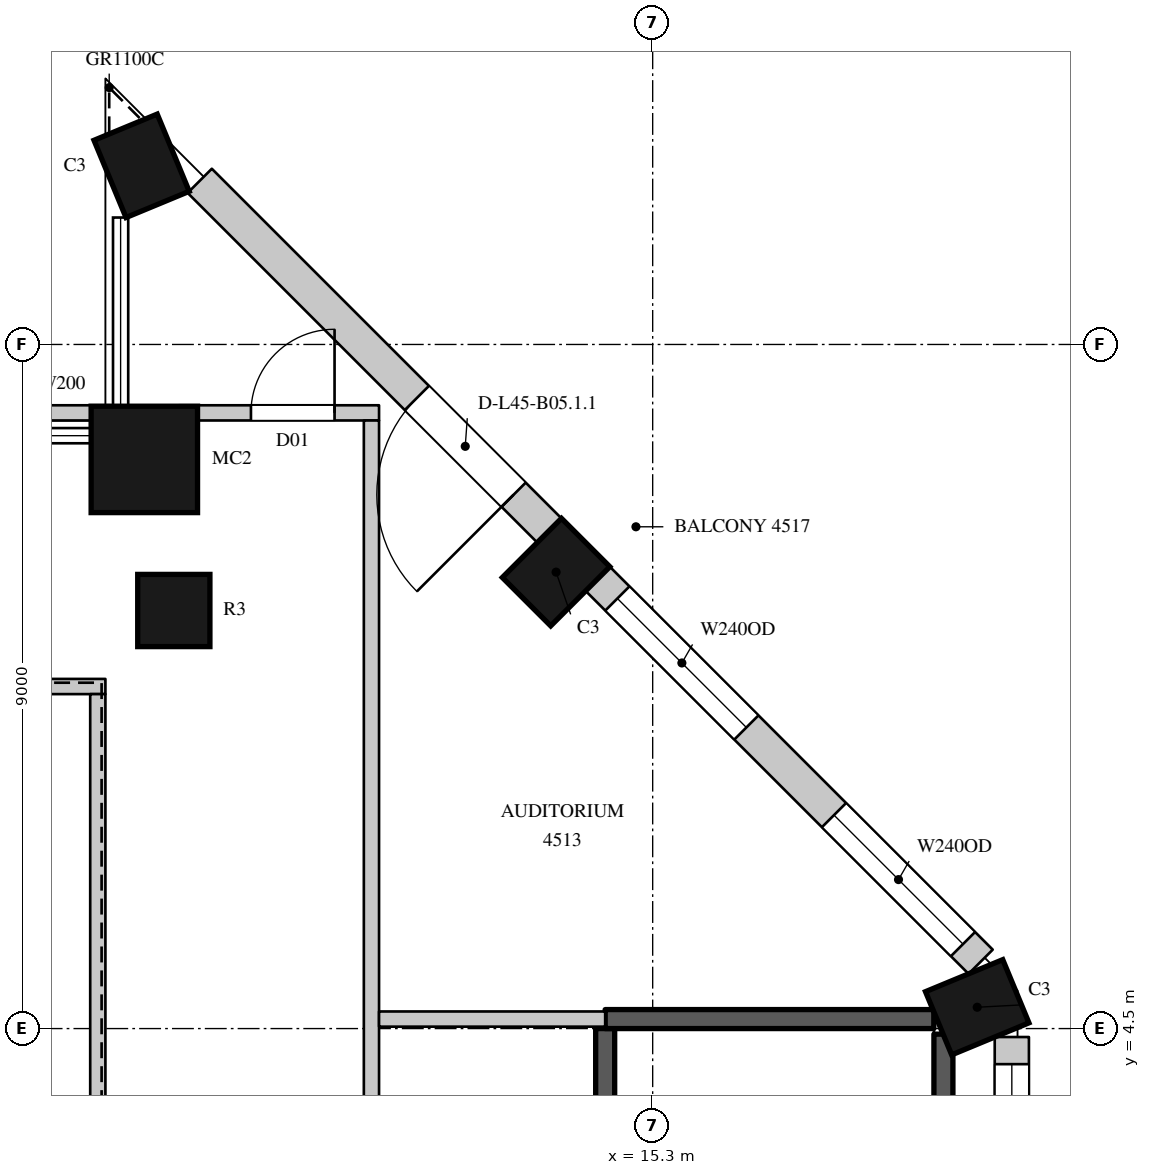
"""IFC4 building model, lengths in metres.
Left out: names, types, materials, properties, quantities, classifications, styles, units other than length and angle.
Written with IfcOpenShell. Run it as: python <this file> out.ifc"""

import sys

from ifc_helpers import new_model, si_unit, direction, frame, frame_2d, origin, origin_2d, place, context, subcontext, project, spatial, rectangle, circle, extrude, element, fill, save


model = new_model("IFC4")
c1 = context("Model", 3, precision=1e-05, world=origin(), true_north=direction((0.0, 1.0)))
c2 = subcontext(c1, "Body", "Model", "MODEL_VIEW")
j1 = project(units=[si_unit("LENGTHUNIT", "METRE"), si_unit("PLANEANGLEUNIT", "RADIAN")], contexts=[c1])
p1 = place(None, origin())
s1 = spatial("IfcSite", under=j1, at=p1, CompositionType="ELEMENT")
p2 = place(p1, origin())
s2 = spatial("IfcBuilding", under=s1, at=p2, CompositionType="ELEMENT")
p3 = place(p2, frame((0.0, 0.0, 205.6)))
s3 = spatial("IfcBuildingStorey", under=s2, at=p3, CompositionType="ELEMENT", Elevation=205.6)
for number, where, z_axis, x_axis in (
    (1, (19.57, 4.78, 0.0), (0.0, 0.0, 1.0), (-0.383, 0.924, 0.0)),
    (2, (14.029, 10.505, 0.0), (0.0, 0.0, 1.0), (-0.707, 0.707, 0.0)),
    (3, (8.576, 15.85, 0.0), (0.0, 0.0, 1.0), (-0.924, -0.383, 0.0)),
):
    element("IfcColumn", number, at=place(p3, frame(where, z_axis=z_axis, x_axis=x_axis)), inside=s3, PredefinedType="COLUMN", context=c2, shape_type="SweptSolid", body=[
        extrude(rectangle(XDim=0.9, YDim=1.1, at=origin_2d()), origin(), (0.0, 0.0, 1.0), 4.1),
    ])
p4 = place(p3, frame((8.612, 11.988, 0.0), z_axis=(0.0, 0.0, 1.0), x_axis=(1.0, 0.0, 0.0)))
e4 = element("IfcColumn", 4, at=p4, inside=s3, PredefinedType="COLUMN", context=c2, shape_type="SweptSolid", body=[
    extrude(circle(Radius=0.7, at=origin_2d()), origin(), (0.0, 0.0, 1.0), 4.1),
])
p5 = place(p3, frame((9.0, 10.0, 0.0), z_axis=(0.0, 0.0, 1.0), x_axis=(1.0, 0.0, 0.0)))
e5 = element("IfcColumn", 5, at=p5, inside=s3, PredefinedType="COLUMN", context=c2, shape_type="SweptSolid", body=[
    extrude(circle(Radius=0.475, at=origin_2d()), origin(), (0.0, 0.0, 1.0), 4.1),
])
p6 = place(p3, frame((20.025, -4.05, 0.0), z_axis=(0.0, 0.0, 1.0), x_axis=(0.0, 1.0, 0.0)))
e6 = element("IfcWall", 6, at=p6, inside=s3, PredefinedType="SOLIDWALL", context=c2, shape_type="SweptSolid", body=[
    extrude(rectangle(XDim=8.439, YDim=0.45, at=frame_2d((4.219, 0.0))), origin(), (0.0, 0.0, 1.0), 3.8),
])
p7 = place(p6, frame((0.394, 0.0, 1.05)))
e7 = element("IfcOpeningElement", 7, at=p7, cuts=e6, PredefinedType="OPENING", context=c2, shape_type="SweptSolid", body=[
    extrude(rectangle(XDim=3.0, YDim=2.4, at=frame_2d((1.5, 1.2))), frame((0.0, 0.235, 0.0), z_axis=(0.0, -1.0, 0.0), x_axis=(1.0, 0.0, 0.0)), (0.0, 0.0, 1.0), 0.47),
])
p8 = place(p6, frame((5.082, 0.0, 1.05)))
e8 = element("IfcOpeningElement", 8, at=p8, cuts=e6, PredefinedType="OPENING", context=c2, shape_type="SweptSolid", body=[
    extrude(rectangle(XDim=3.0, YDim=2.4, at=frame_2d((1.5, 1.2))), frame((0.0, 0.235, 0.0), z_axis=(0.0, -1.0, 0.0), x_axis=(1.0, 0.0, 0.0)), (0.0, 0.0, 1.0), 0.47),
])
p9 = place(p3, frame((19.615, 5.379, 0.0), z_axis=(0.0, 0.0, 1.0), x_axis=(-0.707089646058, 0.7071239159, 0.0)))
e9 = element("IfcWall", 9, at=p9, inside=s3, PredefinedType="SOLIDWALL", context=c2, shape_type="SweptSolid", body=[
    extrude(rectangle(XDim=7.124, YDim=0.45, at=frame_2d((3.562, 0.0))), origin(), (0.0, 0.0, 1.0), 3.8),
])
p10 = place(p9, frame((0.328, 0.0, 1.05)))
e10 = element("IfcOpeningElement", 10, at=p10, cuts=e9, PredefinedType="OPENING", context=c2, shape_type="SweptSolid", body=[
    extrude(rectangle(XDim=2.4, YDim=2.4, at=frame_2d((1.2, 1.2))), frame((0.0, 0.235, 0.0), z_axis=(0.0, -1.0, 0.0), x_axis=(1.0, 0.0, 0.0)), (0.0, 0.0, 1.0), 0.47),
])
p11 = place(p9, frame((4.359, 0.0, 1.05)))
e11 = element("IfcOpeningElement", 11, at=p11, cuts=e9, PredefinedType="OPENING", context=c2, shape_type="SweptSolid", body=[
    extrude(rectangle(XDim=2.4, YDim=2.4, at=frame_2d((1.2, 1.2))), frame((0.0, 0.235, 0.0), z_axis=(0.0, -1.0, 0.0), x_axis=(1.0, 0.0, 0.0)), (0.0, 0.0, 1.0), 0.47),
])
p12 = place(p3, frame((13.941, 11.053, 0.0), z_axis=(0.0, 0.0, 1.0), x_axis=(-0.707106781187, 0.707106781187, 0.0)))
e12 = element("IfcWall", 12, at=p12, inside=s3, PredefinedType="SOLIDWALL", context=c2, shape_type="SweptSolid", body=[
    extrude(rectangle(XDim=6.505, YDim=0.45, at=frame_2d((3.252, 0.0))), origin(), (0.0, 0.0, 1.0), 3.8),
])
p13 = place(p12, frame((0.665, 0.0, 0.0)))
e13 = element("IfcOpeningElement", 13, at=p13, cuts=e12, PredefinedType="OPENING", context=c2, shape_type="SweptSolid", body=[
    extrude(rectangle(XDim=1.8, YDim=2.4, at=frame_2d((0.9, 1.2))), frame((0.0, 0.235, 0.0), z_axis=(0.0, -1.0, 0.0), x_axis=(1.0, 0.0, 0.0)), (0.0, 0.0, 1.0), 0.47),
])
p14 = place(p3, frame((4.52, 9.0, 0.0), z_axis=(0.0, 0.0, 1.0), x_axis=(1.0, 0.0, 0.0)))
e14 = element("IfcWall", 14, at=p14, inside=s3, PredefinedType="PARTITIONING", context=c2, shape_type="SweptSolid", body=[
    extrude(rectangle(XDim=3.58, YDim=0.2, at=frame_2d((1.79, 0.0))), origin(), (0.0, 0.0, 1.0), 3.8),
])
p15 = place(p3, frame((6.75, 12.6, 0.0), z_axis=(0.0, 0.0, 1.0), x_axis=(1.0, 0.0, 0.0)))
e15 = element("IfcWall", 15, at=p15, inside=s3, PredefinedType="PARTITIONING", context=c2, shape_type="SweptSolid", body=[
    extrude(rectangle(XDim=1.41, YDim=0.2, at=frame_2d((0.705, 0.0))), origin(), (0.0, 0.0, 1.0), 3.8),
])
p16 = place(p3, frame((8.0, -8.9, 0.0), z_axis=(0.0, 0.0, 1.0), x_axis=(0.0, 1.0, 0.0)))
e16 = element("IfcWall", 16, at=p16, inside=s3, PredefinedType="PARTITIONING", context=c2, shape_type="SweptSolid", body=[
    extrude(rectangle(XDim=17.8, YDim=0.2, at=frame_2d((8.9, 0.0))), origin(), (0.0, 0.0, 1.0), 3.8),
])
p17 = place(p3, frame((9.065, 12.6, 0.0), z_axis=(0.0, 0.0, 1.0), x_axis=(1.0, 0.0, 0.0)))
e17 = element("IfcWall", 17, at=p17, inside=s3, PredefinedType="PARTITIONING", context=c2, shape_type="SweptSolid", body=[
    extrude(rectangle(XDim=2.635, YDim=0.2, at=frame_2d((1.318, 0.0))), origin(), (0.0, 0.0, 1.0), 3.8),
])
p18 = place(p17, frame((0.95, 0.0, 0.0)))
e18 = element("IfcOpeningElement", 18, at=p18, cuts=e17, PredefinedType="OPENING", context=c2, shape_type="SweptSolid", body=[
    extrude(rectangle(XDim=1.1, YDim=2.4, at=frame_2d((0.55, 1.2))), frame((0.0, 0.11, 0.0), z_axis=(0.0, -1.0, 0.0), x_axis=(1.0, 0.0, 0.0)), (0.0, 0.0, 1.0), 0.22),
])
p19 = place(p3, frame((11.6, -12.6, 0.0), z_axis=(0.0, 0.0, 1.0), x_axis=(0.0, 1.0, 0.0)))
e19 = element("IfcWall", 19, at=p19, inside=s3, PredefinedType="PARTITIONING", context=c2, shape_type="SweptSolid", body=[
    extrude(rectangle(XDim=25.1, YDim=0.2, at=frame_2d((12.55, 0.0))), origin(), (0.0, 0.0, 1.0), 3.8),
])
p20 = place(p19, frame((10.45, 0.0, 0.0)))
e20 = element("IfcOpeningElement", 20, at=p20, cuts=e19, PredefinedType="OPENING", context=c2, shape_type="SweptSolid", body=[
    extrude(rectangle(XDim=1.5, YDim=2.4, at=frame_2d((0.75, 1.2))), frame((0.0, 0.11, 0.0), z_axis=(0.0, -1.0, 0.0), x_axis=(1.0, 0.0, 0.0)), (0.0, 0.0, 1.0), 0.22),
])
p21 = place(p19, frame((3.45, 0.0, 0.0)))
e21 = element("IfcOpeningElement", 21, at=p21, cuts=e19, PredefinedType="OPENING", context=c2, shape_type="SweptSolid", body=[
    extrude(rectangle(XDim=1.1, YDim=2.4, at=frame_2d((0.55, 1.2))), frame((0.0, 0.11, 0.0), z_axis=(0.0, -1.0, 0.0), x_axis=(1.0, 0.0, 0.0)), (0.0, 0.0, 1.0), 0.22),
])
p22 = place(p3, frame((11.7, 4.625, 0.0), z_axis=(0.0, 0.0, 1.0), x_axis=(1.0, 0.0, 0.0)))
e22 = element("IfcWall", 22, at=p22, inside=s3, PredefinedType="PARTITIONING", context=c2, shape_type="SweptSolid", body=[
    extrude(rectangle(XDim=2.975, YDim=0.2, at=frame_2d((1.488, 0.0))), origin(), (0.0, 0.0, 1.0), 3.8),
])
p23 = place(p3, frame((14.675, -4.5, 0.0), z_axis=(0.0, 0.0, 1.0), x_axis=(0.0, 1.0, 0.0)))
e23 = element("IfcWall", 23, at=p23, inside=s3, PredefinedType="SHEAR", context=c2, shape_type="SweptSolid", body=[
    extrude(rectangle(XDim=9.0, YDim=0.25, at=frame_2d((4.5, 0.0))), origin(), (0.0, 0.0, 1.0), 3.8),
])
p24 = place(p23, frame((0.45, 0.0, 0.0)))
e24 = element("IfcOpeningElement", 24, at=p24, cuts=e23, PredefinedType="OPENING", context=c2, shape_type="SweptSolid", body=[
    extrude(rectangle(XDim=1.1, YDim=2.2, at=frame_2d((0.55, 1.1))), frame((0.0, 0.135, 0.0), z_axis=(0.0, -1.0, 0.0), x_axis=(1.0, 0.0, 0.0)), (0.0, 0.0, 1.0), 0.27),
])
p25 = place(p3, frame((14.675, 4.625, 0.0), z_axis=(0.0, 0.0, 1.0), x_axis=(1.0, 0.0, 0.0)))
e25 = element("IfcWall", 25, at=p25, inside=s3, PredefinedType="SHEAR", context=c2, shape_type="SweptSolid", body=[
    extrude(rectangle(XDim=4.324, YDim=0.25, at=frame_2d((2.162, 0.0))), origin(), (0.0, 0.0, 1.0), 3.8),
])
p26 = place(p3, frame((19.125, -4.05, 0.0), z_axis=(0.0, 0.0, 1.0), x_axis=(0.0, 1.0, 0.0)))
e26 = element("IfcWall", 26, at=p26, inside=s3, PredefinedType="SHEAR", context=c2, shape_type="SweptSolid", body=[
    extrude(rectangle(XDim=8.477, YDim=0.25, at=frame_2d((4.238, 0.0))), origin(), (0.0, 0.0, 1.0), 3.8),
])
p27 = place(p8, origin())
e27 = element("IfcWindow", 27, at=p27, inside=s3, PartitioningType="SINGLE_PANEL", PredefinedType="WINDOW", context=c2, shape_type="SweptSolid", body=[
    extrude(rectangle(XDim=3.0, YDim=2.4, at=frame_2d((1.5, 1.2))), frame((0.0, 0.135, 0.0), z_axis=(0.0, -1.0, 0.0), x_axis=(1.0, 0.0, 0.0)), (0.0, 0.0, 1.0), 0.06),
])
fill(e8, e27)
p28 = place(p10, origin())
e28 = element("IfcWindow", 28, at=p28, inside=s3, PartitioningType="SINGLE_PANEL", PredefinedType="WINDOW", context=c2, shape_type="SweptSolid", body=[
    extrude(rectangle(XDim=2.4, YDim=2.4, at=frame_2d((1.2, 1.2))), frame((0.0, 0.135, 0.0), z_axis=(0.0, -1.0, 0.0), x_axis=(1.0, 0.0, 0.0)), (0.0, 0.0, 1.0), 0.06),
])
fill(e10, e28)
p29 = place(p11, origin())
e29 = element("IfcWindow", 29, at=p29, inside=s3, PartitioningType="SINGLE_PANEL", PredefinedType="WINDOW", context=c2, shape_type="SweptSolid", body=[
    extrude(rectangle(XDim=2.4, YDim=2.4, at=frame_2d((1.2, 1.2))), frame((0.0, 0.135, 0.0), z_axis=(0.0, -1.0, 0.0), x_axis=(1.0, 0.0, 0.0)), (0.0, 0.0, 1.0), 0.06),
])
fill(e11, e29)
p30 = place(p13, origin())
e30 = element("IfcDoor", 30, at=p30, inside=s3, OperationType="SLIDING_TO_LEFT", PredefinedType="DOOR", context=c2, shape_type="SweptSolid", body=[
    extrude(rectangle(XDim=1.8, YDim=2.4, at=frame_2d((0.9, 1.2))), frame((0.0, 0.13, 0.0), z_axis=(0.0, -1.0, 0.0), x_axis=(1.0, 0.0, 0.0)), (0.0, 0.0, 1.0), 0.05),
])
fill(e13, e30)
p31 = place(p18, origin())
e31 = element("IfcDoor", 31, at=p31, inside=s3, OperationType="SINGLE_SWING_RIGHT", PredefinedType="DOOR", context=c2, shape_type="SweptSolid", body=[
    extrude(rectangle(XDim=1.1, YDim=2.4, at=frame_2d((0.55, 1.2))), frame((0.0, 0.025, 0.0), z_axis=(0.0, -1.0, 0.0), x_axis=(1.0, 0.0, 0.0)), (0.0, 0.0, 1.0), 0.05),
])
fill(e18, e31)
save(model, sys.argv[1])
